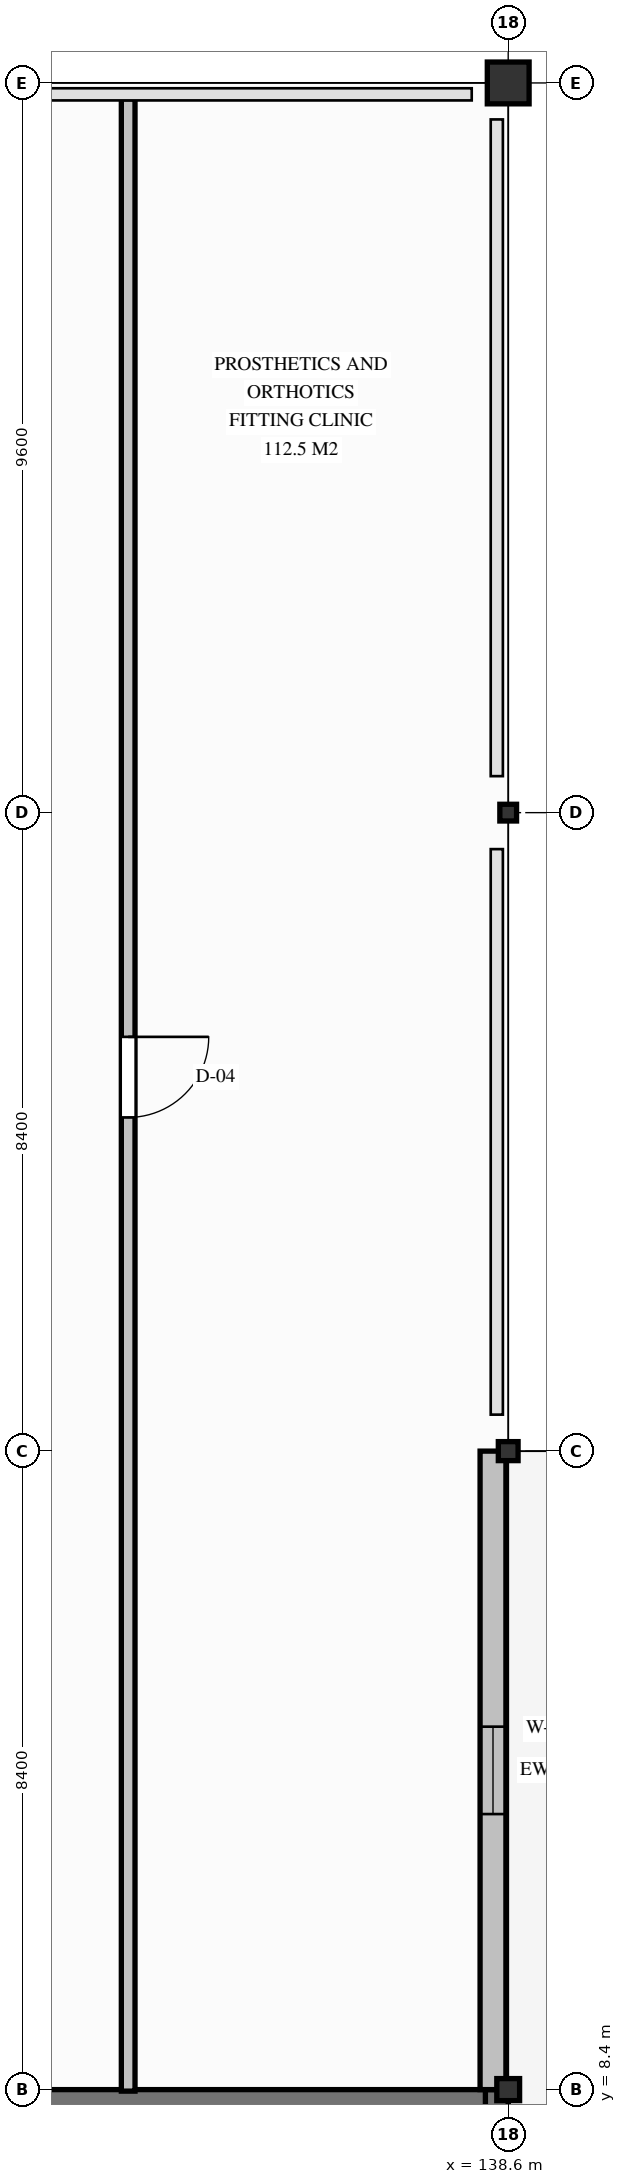
"""IFC4 building model, lengths in metres.
Left out: names, types, materials, properties, quantities, classifications, styles, units other than length and angle.
Written with IfcOpenShell. Run it as: python <this file> out.ifc"""

import sys

from ifc_helpers import new_model, si_unit, direction, frame, frame_2d, origin, origin_2d, place, context, subcontext, project, spatial, rectangle, hollow_rectangle, i_section, extrude, element, fill, save


model = new_model("IFC4")
c1 = context("Model", 3, precision=1e-05, world=origin(), true_north=direction((0.0, 1.0)))
c2 = subcontext(c1, "Body", "Model", "MODEL_VIEW")
j1 = project(units=[si_unit("LENGTHUNIT", "METRE"), si_unit("PLANEANGLEUNIT", "RADIAN")], contexts=[c1])
p1 = place(None, origin())
s1 = spatial("IfcSite", under=j1, at=p1, CompositionType="ELEMENT")
p2 = place(p1, origin())
s2 = spatial("IfcBuilding", under=s1, at=p2, CompositionType="ELEMENT")
p3 = place(p2, frame((0.0, 0.0, 4.5)))
s3 = spatial("IfcBuildingStorey", under=s2, at=p3, CompositionType="ELEMENT", Elevation=4.5)
p4 = place(p3, frame((130.2, 8.25, 0.0), z_axis=(0.0, 0.0, 1.0), x_axis=(1.0, 0.0, 0.0)))
e1 = element("IfcWall", 1, at=p4, inside=s3, PredefinedType="SHEAR", context=c2, shape_type="SweptSolid", body=[
    extrude(rectangle(XDim=8.4, YDim=0.3, at=frame_2d((4.2, 0.0))), origin(), (0.0, 0.0, 1.0), 4.5),
])
p5 = place(p4, frame((0.8, 0.0, 0.0)))
e2 = element("IfcOpeningElement", 2, at=p5, cuts=e1, PredefinedType="OPENING", context=c2, shape_type="SweptSolid", body=[
    extrude(rectangle(XDim=1.1, YDim=2.15, at=frame_2d((0.55, 1.075))), frame((0.0, 0.16, 0.0), z_axis=(0.0, -1.0, 0.0), x_axis=(1.0, 0.0, 0.0)), (0.0, 0.0, 1.0), 0.32),
])
p6 = place(p3, frame((138.45, 0.0, 0.0), z_axis=(0.0, 0.0, 1.0), x_axis=(0.0, 1.0, 0.0)))
e3 = element("IfcWall", 3, at=p6, inside=s3, PredefinedType="SHEAR", context=c2, shape_type="SweptSolid", body=[
    extrude(rectangle(XDim=8.4, YDim=0.3, at=frame_2d((4.2, 0.0))), origin(), (0.0, 0.0, 1.0), 4.5),
])
p7 = place(p3, frame((138.6, 8.4, 0.0), z_axis=(0.0, 0.0, 1.0), x_axis=(1.0, 0.0, 0.0)))
e4 = element("IfcColumn", 4, at=p7, inside=s3, PredefinedType="COLUMN", context=c2, shape_type="SweptSolid", body=[
    extrude(i_section(OverallWidth=0.3, OverallDepth=0.29, WebThickness=0.009, FlangeThickness=0.014, FilletRadius=0.027, at=origin_2d()), origin(), (0.0, 0.0, 1.0), 4.5),
])
p8 = place(p3, frame((138.6, 16.8, 0.0), z_axis=(0.0, 0.0, 1.0), x_axis=(1.0, 0.0, 0.0)))
e5 = element("IfcColumn", 5, at=p8, inside=s3, PredefinedType="COLUMN", context=c2, shape_type="SweptSolid", body=[
    extrude(i_section(OverallWidth=0.26, OverallDepth=0.25, WebThickness=0.008, FlangeThickness=0.012, FilletRadius=0.024, at=origin_2d()), origin(), (0.0, 0.0, 1.0), 4.5),
])
p9 = place(p3, frame((138.6, 25.2, 0.0), z_axis=(0.0, 0.0, 1.0), x_axis=(1.0, 0.0, 0.0)))
e6 = element("IfcColumn", 6, at=p9, inside=s3, PredefinedType="COLUMN", context=c2, shape_type="SweptSolid", body=[
    extrude(hollow_rectangle(XDim=0.22, YDim=0.22, WallThickness=0.012, InnerFilletRadius=0.019, OuterFilletRadius=0.031, at=origin_2d()), origin(), (0.0, 0.0, 1.0), 4.5),
])
p10 = place(p3, frame((138.6, 34.8, 0.0), z_axis=(0.0, 0.0, 1.0), x_axis=(1.0, 0.0, 0.0)))
e7 = element("IfcColumn", 7, at=p10, inside=s3, PredefinedType="COLUMN", context=c2, shape_type="SweptSolid", body=[
    extrude(rectangle(XDim=0.55, YDim=0.55, at=origin_2d()), origin(), (0.0, 0.0, 1.0), 4.5),
])
p11 = place(p3, frame((138.4, 16.8, 0.0), z_axis=(0.0, 0.0, 1.0), x_axis=(0.0, -1.0, 0.0)))
e8 = element("IfcWall", 8, at=p11, inside=s3, PredefinedType="SOLIDWALL", context=c2, shape_type="SweptSolid", body=[
    extrude(rectangle(XDim=8.4, YDim=0.34, at=frame_2d((4.2, 0.0))), origin(), (0.0, 0.0, 1.0), 3.678),
])
p12 = place(p11, frame((3.625, 0.0, 0.85)))
e9 = element("IfcOpeningElement", 9, at=p12, cuts=e8, PredefinedType="OPENING", context=c2, shape_type="SweptSolid", body=[
    extrude(rectangle(XDim=1.15, YDim=1.55, at=frame_2d((0.575, 0.775))), frame((0.0, 0.18, 0.0), z_axis=(0.0, -1.0, 0.0), x_axis=(1.0, 0.0, 0.0)), (0.0, 0.0, 1.0), 0.36),
])
p13 = place(p3, frame((133.6, 34.59, 0.0), z_axis=(0.0, 0.0, 1.0), x_axis=(0.0, -1.0, 0.0)))
e10 = element("IfcWall", 10, at=p13, inside=s3, PredefinedType="PARTITIONING", context=c2, shape_type="SweptSolid", body=[
    extrude(rectangle(XDim=26.21, YDim=0.18, at=frame_2d((13.105, 0.0))), origin(), (0.0, 0.0, 1.0), 3.898),
])
p14 = place(p13, frame((12.34, 0.0, 0.0)))
e11 = element("IfcOpeningElement", 11, at=p14, cuts=e10, PredefinedType="OPENING", context=c2, shape_type="SweptSolid", body=[
    extrude(rectangle(XDim=1.06, YDim=2.16, at=frame_2d((0.53, 1.08))), frame((0.0, 0.1, 0.0), z_axis=(0.0, -1.0, 0.0), x_axis=(1.0, 0.0, 0.0)), (0.0, 0.0, 1.0), 0.2),
])
p15 = place(p12, origin())
e12 = element("IfcWindow", 12, at=p15, inside=s3, PartitioningType="SINGLE_PANEL", PredefinedType="WINDOW", context=c2, shape_type="SweptSolid", body=[
    extrude(rectangle(XDim=1.15, YDim=1.55, at=frame_2d((0.575, 0.775))), frame((0.0, 0.03, 0.0), z_axis=(0.0, -1.0, 0.0), x_axis=(1.0, 0.0, 0.0)), (0.0, 0.0, 1.0), 0.06),
])
fill(e9, e12)
p16 = place(p14, origin())
e13 = element("IfcDoor", 13, at=p16, inside=s3, OperationType="SINGLE_SWING_LEFT", PredefinedType="DOOR", context=c2, shape_type="SweptSolid", body=[
    extrude(rectangle(XDim=1.06, YDim=2.16, at=frame_2d((0.53, 1.08))), frame((0.0, 0.025, 0.0), z_axis=(0.0, -1.0, 0.0), x_axis=(1.0, 0.0, 0.0)), (0.0, 0.0, 1.0), 0.05),
])
fill(e11, e13)
save(model, sys.argv[1])
